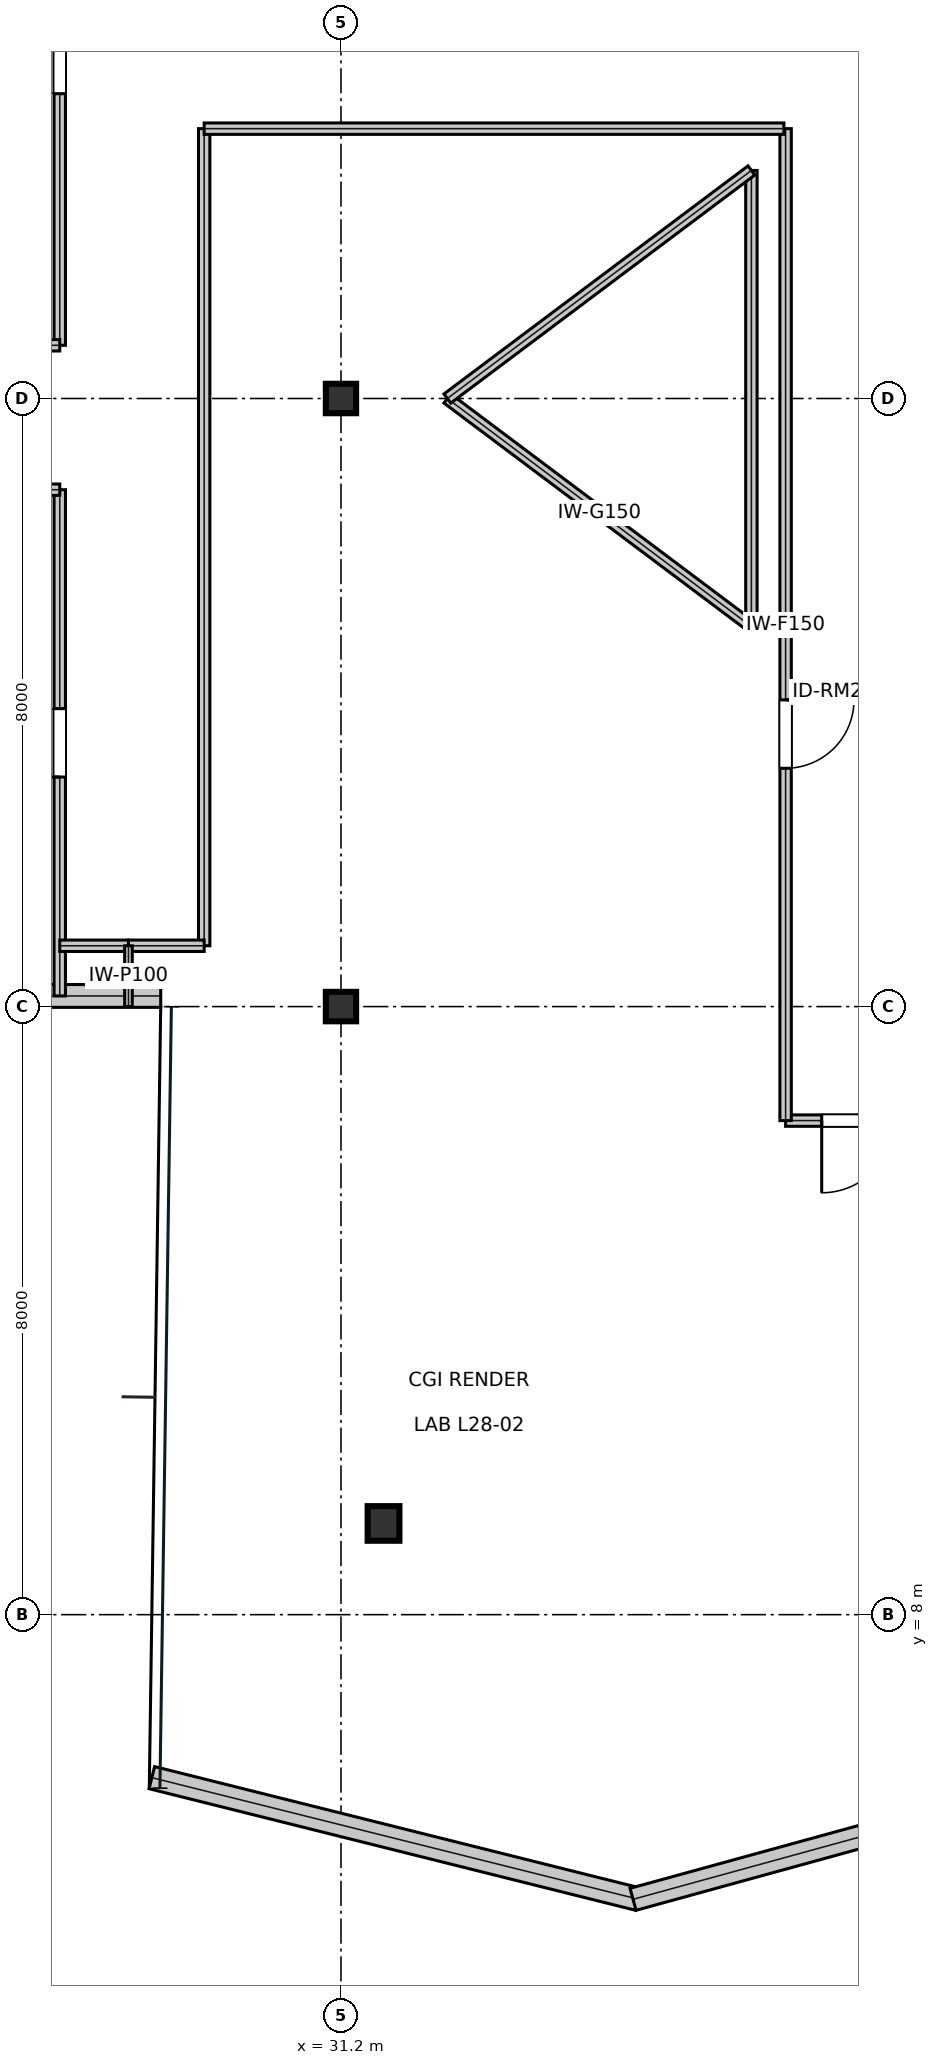
"""IFC4 building model, lengths in metres.
Left out: names, types, materials, properties, quantities, classifications, styles, units other than length and angle.
Written with IfcOpenShell. Run it as: python <this file> out.ifc"""

import sys

from ifc_helpers import new_model, si_unit, direction, frame, frame_2d, origin, origin_2d, place, context, subcontext, project, spatial, rectangle, i_section, extrude, element, fill, save


model = new_model("IFC4")
c1 = context("Model", 3, precision=1e-05, world=origin(), true_north=direction((0.0, 1.0)))
c2 = subcontext(c1, "Body", "Model", "MODEL_VIEW")
j1 = project(units=[si_unit("LENGTHUNIT", "METRE"), si_unit("PLANEANGLEUNIT", "RADIAN")], contexts=[c1])
p1 = place(None, origin())
s1 = spatial("IfcSite", under=j1, at=p1, CompositionType="ELEMENT")
p2 = place(p1, origin())
s2 = spatial("IfcBuilding", under=s1, at=p2, CompositionType="ELEMENT")
p3 = place(p2, frame((0.0, 0.0, 124.95)))
s3 = spatial("IfcBuildingStorey", under=s2, at=p3, CompositionType="ELEMENT", Elevation=124.95)
for number, where, z_axis, x_axis in (
    (1, (31.2, 16.0, 0.0), (0.0, 0.0, 1.0), (1.0, 0.0, 0.0)),
    (2, (31.2, 24.0, 0.0), (0.0, 0.0, 1.0), (1.0, 0.0, 0.0)),
):
    element("IfcColumn", number, at=place(p3, frame(where, z_axis=z_axis, x_axis=x_axis)), inside=s3, PredefinedType="COLUMN", context=c2, shape_type="SweptSolid", body=[
        extrude(i_section(OverallWidth=0.398, OverallDepth=0.387, WebThickness=0.021, FlangeThickness=0.033, at=origin_2d()), origin(), (0.0, 0.0, 1.0), 4.044),
    ])
p4 = place(p3, frame((31.76, 9.2, 0.016), z_axis=(0.017424577167, 0.037338379644, 0.999150754149), x_axis=(-0.906183139995, 0.422885465331, 0.0)))
e3 = element("IfcColumn", 3, at=p4, inside=s3, PredefinedType="COLUMN", context=c2, shape_type="SweptSolid", body=[
    extrude(i_section(OverallWidth=0.418, OverallDepth=0.455, WebThickness=0.042, FlangeThickness=0.068, at=origin_2d()), origin(), (0.0, 0.0, 1.0), 4.021),
])
p5 = place(p3, frame((26.04, 16.14, 0.0), z_axis=(0.0, 0.0, 1.0), x_axis=(1.0, 0.0, 0.0)))
e4 = element("IfcWall", 4, at=p5, inside=s3, PredefinedType="STANDARD", context=c2, shape_type="SweptSolid", body=[
    extrude(rectangle(XDim=2.788, YDim=0.3, at=frame_2d((1.394, 0.0))), origin(), (0.0, 0.0, 1.0), 3.81),
])
p6 = place(p3, frame((28.712, 5.856, 0.0), z_axis=(0.0, 0.0, 1.0), x_axis=(0.970168608955, -0.242431165897, 0.0)))
e5 = element("IfcWall", 5, at=p6, inside=s3, PredefinedType="STANDARD", context=c2, shape_type="SweptSolid", body=[
    extrude(rectangle(XDim=6.599, YDim=0.3, at=frame_2d((3.3, 0.0))), origin(), (0.0, 0.0, 1.0), 3.81),
])
p7 = place(p3, frame((35.043, 4.255, 0.0), z_axis=(0.0, 0.0, 1.0), x_axis=(0.96422724659, 0.265077001894, 0.0)))
e6 = element("IfcWall", 6, at=p7, inside=s3, PredefinedType="STANDARD", context=c2, shape_type="SweptSolid", body=[
    extrude(rectangle(XDim=6.64, YDim=0.3, at=frame_2d((3.32, 0.0))), origin(), (0.0, 0.0, 1.0), 3.81),
])
p8 = place(p3, frame((37.05, 14.5, 0.0), z_axis=(0.0, 0.0, 1.0), x_axis=(1.0, 0.0, 0.0)))
e7 = element("IfcWall", 7, at=p8, inside=s3, PredefinedType="PARTITIONING", context=c2, shape_type="SweptSolid", body=[
    extrude(rectangle(XDim=1.9, YDim=0.15, at=frame_2d((0.95, 0.0))), origin(), (0.0, 0.0, 1.0), 3.19),
])
p9 = place(p8, frame((0.475, 0.0, 0.0)))
e8 = element("IfcOpeningElement", 8, at=p9, cuts=e7, PredefinedType="OPENING", context=c2, shape_type="SweptSolid", body=[
    extrude(rectangle(XDim=0.95, YDim=2.15, at=frame_2d((0.475, 1.075))), frame((0.0, 0.085, 0.0), z_axis=(0.0, -1.0, 0.0), x_axis=(1.0, 0.0, 0.0)), (0.0, 0.0, 1.0), 0.17),
])
p10 = place(p3, frame((37.05, 14.5, 0.0), z_axis=(0.0, 0.0, 1.0), x_axis=(0.0, 1.0, 0.0)))
e9 = element("IfcWall", 9, at=p10, inside=s3, PredefinedType="PARTITIONING", context=c2, shape_type="SweptSolid", body=[
    extrude(rectangle(XDim=13.05, YDim=0.15, at=frame_2d((6.525, 0.0))), origin(), (0.0, 0.0, 1.0), 3.19),
])
p11 = place(p10, frame((4.635, 0.0, 0.0)))
e10 = element("IfcOpeningElement", 10, at=p11, cuts=e9, PredefinedType="OPENING", context=c2, shape_type="SweptSolid", body=[
    extrude(rectangle(XDim=0.9, YDim=2.15, at=frame_2d((0.45, 1.075))), frame((0.0, 0.085, 0.0), z_axis=(0.0, -1.0, 0.0), x_axis=(1.0, 0.0, 0.0)), (0.0, 0.0, 1.0), 0.17),
])
p12 = place(p3, frame((27.5, 16.14, 0.0), z_axis=(0.0, 0.0, 1.0), x_axis=(0.0, 1.0, 0.0)))
e11 = element("IfcWall", 11, at=p12, inside=s3, PredefinedType="PARTITIONING", context=c2, shape_type="SweptSolid", body=[
    extrude(rectangle(XDim=6.66, YDim=0.15, at=frame_2d((3.33, 0.0))), origin(), (0.0, 0.0, 1.0), 3.338),
])
p13 = place(p12, frame((2.88, 0.0, 0.0)))
e12 = element("IfcOpeningElement", 12, at=p13, cuts=e11, PredefinedType="OPENING", context=c2, shape_type="SweptSolid", body=[
    extrude(rectangle(XDim=0.9, YDim=2.15, at=frame_2d((0.45, 1.075))), frame((0.0, 0.085, 0.0), z_axis=(0.0, -1.0, 0.0), x_axis=(1.0, 0.0, 0.0)), (0.0, 0.0, 1.0), 0.17),
])
p14 = place(p3, frame((27.5, 24.7, 0.0), z_axis=(0.0, 0.0, 1.0), x_axis=(0.0, 1.0, 0.0)))
e13 = element("IfcWall", 13, at=p14, inside=s3, PredefinedType="PARTITIONING", context=c2, shape_type="SweptSolid", body=[
    extrude(rectangle(XDim=7.16, YDim=0.15, at=frame_2d((3.58, 0.0))), origin(), (0.0, 0.0, 1.0), 3.338),
])
p15 = place(p14, frame((3.31, 0.0, 0.0)))
e14 = element("IfcOpeningElement", 14, at=p15, cuts=e13, PredefinedType="OPENING", context=c2, shape_type="SweptSolid", body=[
    extrude(rectangle(XDim=0.9, YDim=2.15, at=frame_2d((0.45, 1.075))), frame((0.0, 0.085, 0.0), z_axis=(0.0, -1.0, 0.0), x_axis=(1.0, 0.0, 0.0)), (0.0, 0.0, 1.0), 0.17),
])
p16 = place(p3, frame((29.4, 16.8, 0.0), z_axis=(0.0, 0.0, 1.0), x_axis=(0.0, 1.0, 0.0)))
e15 = element("IfcWall", 15, at=p16, inside=s3, PredefinedType="PARTITIONING", context=c2, shape_type="SweptSolid", body=[
    extrude(rectangle(XDim=10.75, YDim=0.15, at=frame_2d((5.375, 0.0))), origin(), (0.0, 0.0, 1.0), 3.19),
])
p17 = place(p3, frame((29.4, 27.55, 0.0), z_axis=(0.0, 0.0, 1.0), x_axis=(1.0, 0.0, 0.0)))
e16 = element("IfcWall", 16, at=p17, inside=s3, PredefinedType="PARTITIONING", context=c2, shape_type="SweptSolid", body=[
    extrude(rectangle(XDim=7.628, YDim=0.15, at=frame_2d((3.814, 0.0))), origin(), (0.0, 0.0, 1.0), 3.19),
])
p18 = place(p3, frame((28.404, 16.8, 0.0), z_axis=(0.0, 0.0, 1.0), x_axis=(1.0, 0.0, 0.0)))
e17 = element("IfcWall", 17, at=p18, inside=s3, PredefinedType="PARTITIONING", context=c2, shape_type="SweptSolid", body=[
    extrude(rectangle(XDim=0.996, YDim=0.15, at=frame_2d((0.498, 0.0))), origin(), (0.0, 0.0, 1.0), 3.81),
])
p19 = place(p3, frame((23.1, 22.8, 0.0), z_axis=(0.0, 0.0, 1.0), x_axis=(1.0, 0.0, 0.0)))
e18 = element("IfcWall", 18, at=p19, inside=s3, PredefinedType="PARTITIONING", context=c2, shape_type="SweptSolid", body=[
    extrude(rectangle(XDim=4.4, YDim=0.15, at=frame_2d((2.2, 0.0))), origin(), (0.0, 0.0, 1.0), 3.19),
])
p20 = place(p3, frame((27.5, 16.8, 0.0), z_axis=(0.0, 0.0, 1.0), x_axis=(1.0, 0.0, 0.0)))
e19 = element("IfcWall", 19, at=p20, inside=s3, PredefinedType="PARTITIONING", context=c2, shape_type="SweptSolid", body=[
    extrude(rectangle(XDim=0.904, YDim=0.15, at=frame_2d((0.452, 0.0))), origin(), (0.0, 0.0, 1.0), 3.338),
])
p21 = place(p3, frame((23.1, 24.7, 0.0), z_axis=(0.0, 0.0, 1.0), x_axis=(1.0, 0.0, 0.0)))
e20 = element("IfcWall", 20, at=p21, inside=s3, PredefinedType="PARTITIONING", context=c2, shape_type="SweptSolid", body=[
    extrude(rectangle(XDim=4.4, YDim=0.15, at=frame_2d((2.2, 0.0))), origin(), (0.0, 0.0, 1.0), 3.19),
])
p22 = place(p3, frame((28.404, 16.0, 0.0), z_axis=(0.0, 0.0, 1.0), x_axis=(0.0, 1.0, 0.0)))
e21 = element("IfcWall", 21, at=p22, inside=s3, PredefinedType="PARTITIONING", context=c2, shape_type="SweptSolid", body=[
    extrude(rectangle(XDim=0.8, YDim=0.1, at=frame_2d((0.4, 0.0))), origin(), (0.0, 0.0, 1.0), 3.338),
])
p23 = place(p3, frame((32.6, 24.0, 0.0), z_axis=(0.0, 0.0, 1.0), x_axis=(0.8, -0.6, 0.0)))
e22 = element("IfcWall", 22, at=p23, inside=s3, PredefinedType="MOVABLE", context=c2, shape_type="SweptSolid", body=[
    extrude(rectangle(XDim=5.0, YDim=0.15, at=frame_2d((2.5, 0.0))), origin(), (0.0, 0.0, 1.0), 3.81),
])
p24 = place(p3, frame((36.6, 21.0, 0.0), z_axis=(0.0, 0.0, 1.0), x_axis=(0.0, 1.0, 0.0)))
e23 = element("IfcWall", 23, at=p24, inside=s3, PredefinedType="MOVABLE", context=c2, shape_type="SweptSolid", body=[
    extrude(rectangle(XDim=6.0, YDim=0.15, at=frame_2d((3.0, 0.0))), origin(), (0.0, 0.0, 1.0), 3.81),
])
p25 = place(p3, frame((36.6, 27.0, 0.0), z_axis=(0.0, 0.0, 1.0), x_axis=(-0.8, -0.6, 0.0)))
e24 = element("IfcWall", 24, at=p25, inside=s3, PredefinedType="MOVABLE", context=c2, shape_type="SweptSolid", body=[
    extrude(rectangle(XDim=5.0, YDim=0.15, at=frame_2d((2.5, 0.0))), origin(), (0.0, 0.0, 1.0), 3.81),
])
p26 = place(p9, frame((0.95, 0.0, 0.0), z_axis=(0.0, 0.0, 1.0), x_axis=(-1.0, 0.0, 0.0)))
e25 = element("IfcDoor", 25, at=p26, inside=s3, OperationType="SINGLE_SWING_RIGHT", PredefinedType="DOOR", context=c2, shape_type="SweptSolid", body=[
    extrude(rectangle(XDim=0.95, YDim=2.15, at=frame_2d((0.475, 1.075))), frame((0.0, 0.025, 0.0), z_axis=(0.0, -1.0, 0.0), x_axis=(1.0, 0.0, 0.0)), (0.0, 0.0, 1.0), 0.05),
])
fill(e8, e25)
p27 = place(p11, frame((0.9, 0.0, 0.0), z_axis=(0.0, 0.0, 1.0), x_axis=(-1.0, 0.0, 0.0)))
e26 = element("IfcDoor", 26, at=p27, inside=s3, OperationType="SINGLE_SWING_LEFT", PredefinedType="DOOR", context=c2, shape_type="SweptSolid", body=[
    extrude(rectangle(XDim=0.9, YDim=2.15, at=frame_2d((0.45, 1.075))), frame((0.0, 0.025, 0.0), z_axis=(0.0, -1.0, 0.0), x_axis=(1.0, 0.0, 0.0)), (0.0, 0.0, 1.0), 0.05),
])
fill(e10, e26)
p28 = place(p13, origin())
e27 = element("IfcDoor", 27, at=p28, inside=s3, OperationType="SINGLE_SWING_LEFT", PredefinedType="DOOR", context=c2, shape_type="SweptSolid", body=[
    extrude(rectangle(XDim=0.9, YDim=2.15, at=frame_2d((0.45, 1.075))), frame((0.0, 0.025, 0.0), z_axis=(0.0, -1.0, 0.0), x_axis=(1.0, 0.0, 0.0)), (0.0, 0.0, 1.0), 0.05),
])
fill(e12, e27)
p29 = place(p15, origin())
e28 = element("IfcDoor", 28, at=p29, inside=s3, OperationType="SINGLE_SWING_RIGHT", PredefinedType="DOOR", context=c2, shape_type="SweptSolid", body=[
    extrude(rectangle(XDim=0.9, YDim=2.15, at=frame_2d((0.45, 1.075))), frame((0.0, 0.025, 0.0), z_axis=(0.0, -1.0, 0.0), x_axis=(1.0, 0.0, 0.0)), (0.0, 0.0, 1.0), 0.05),
])
fill(e14, e28)
save(model, sys.argv[1])
